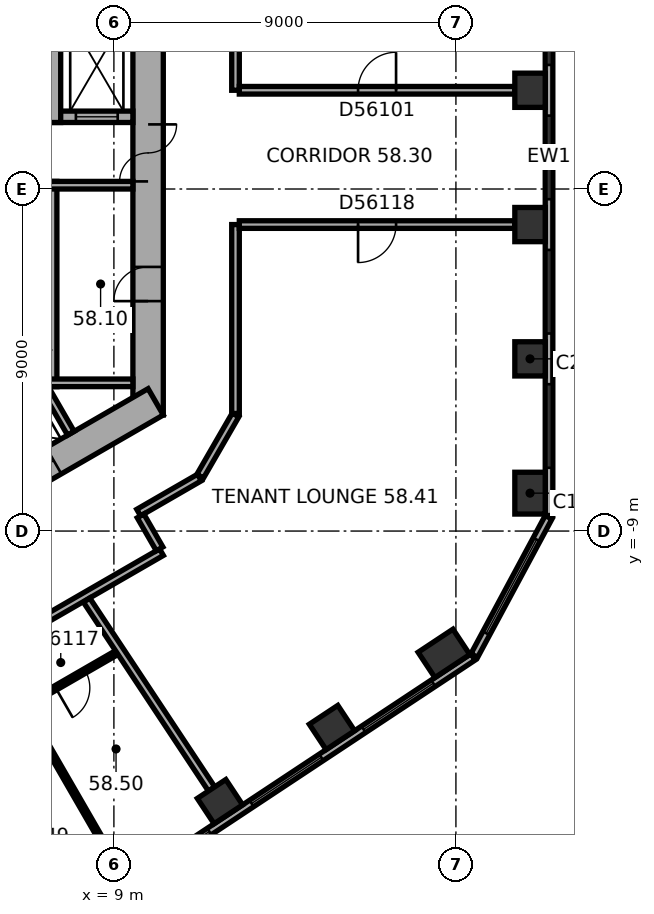
"""IFC4 building model, lengths in metres.
Left out: names, types, materials, properties, quantities, classifications, styles, units other than length and angle.
Written with IfcOpenShell. Run it as: python <this file> out.ifc"""

import sys

from ifc_helpers import new_model, si_unit, direction, frame, frame_2d, origin, origin_2d, place, context, subcontext, project, spatial, rectangle, extrude, element, fill, save


model = new_model("IFC4")
c1 = context("Model", 3, precision=1e-05, world=origin(), true_north=direction((0.0, 1.0)))
c2 = subcontext(c1, "Body", "Model", "MODEL_VIEW")
j1 = project(units=[si_unit("LENGTHUNIT", "METRE"), si_unit("PLANEANGLEUNIT", "RADIAN")], contexts=[c1])
p1 = place(None, origin())
s1 = spatial("IfcSite", under=j1, at=p1, CompositionType="ELEMENT")
p2 = place(p1, origin())
s2 = spatial("IfcBuilding", under=s1, at=p2, CompositionType="ELEMENT")
p3 = place(p2, frame((0.0, 0.0, 236.5)))
s3 = spatial("IfcBuildingStorey", under=s2, at=p3, CompositionType="ELEMENT", Elevation=236.5)
p4 = place(p3, frame((19.95, -8.003, 0.0), z_axis=(0.0, 0.0, 1.0), x_axis=(0.0, 1.0, 0.0)))
e1 = element("IfcColumn", 1, at=p4, inside=s3, PredefinedType="COLUMN", context=c2, shape_type="SweptSolid", body=[
    extrude(rectangle(XDim=1.1, YDim=0.8, at=origin_2d()), origin(), (0.0, 0.0, 1.0), 3.7),
])
for number, where, z_axis, x_axis in (
    (2, (19.95, -4.469, 0.0), (0.0, 0.0, 1.0), (0.0, 1.0, 0.0)),
    (3, (19.95, -0.936, 0.0), (0.0, 0.0, 1.0), (0.0, 1.0, 0.0)),
    (4, (19.95, 2.598, 0.0), (0.0, 0.0, 1.0), (0.0, 1.0, 0.0)),
    (5, (11.791, -16.12, 0.0), (0.0, 0.0, 1.0), (0.834, 0.552, 0.0)),
    (6, (14.738, -14.169, 0.0), (0.0, 0.0, 1.0), (0.834, 0.552, 0.0)),
):
    element("IfcColumn", number, at=place(p3, frame(where, z_axis=z_axis, x_axis=x_axis)), inside=s3, PredefinedType="COLUMN", context=c2, shape_type="SweptSolid", body=[
        extrude(rectangle(XDim=0.9, YDim=0.8, at=origin_2d()), origin(), (0.0, 0.0, 1.0), 3.7),
    ])
p5 = place(p3, frame((17.685, -12.219, 0.0), z_axis=(0.0, 0.0, 1.0), x_axis=(0.833885822067, 0.551936985312, 0.0)))
e7 = element("IfcColumn", 7, at=p5, inside=s3, PredefinedType="COLUMN", context=c2, shape_type="SweptSolid", body=[
    extrude(rectangle(XDim=1.1, YDim=0.8, at=origin_2d()), origin(), (0.0, 0.0, 1.0), 3.7),
])
p6 = place(p3, frame((9.9, -5.947, 0.0), z_axis=(0.0, 0.0, 1.0), x_axis=(0.0, 1.0, 0.0)))
e8 = element("IfcWall", 8, at=p6, inside=s3, PredefinedType="SHEAR", context=c2, shape_type="SweptSolid", body=[
    extrude(rectangle(XDim=11.894, YDim=0.8, at=frame_2d((5.947, 0.0))), origin(), (0.0, 0.0, 1.0), 3.7),
])
p7 = place(p6, frame((6.147, 0.0, 0.0)))
e9 = element("IfcOpeningElement", 9, at=p7, cuts=e8, PredefinedType="OPENING", context=c2, shape_type="SweptSolid", body=[
    extrude(rectangle(XDim=1.5, YDim=2.1, at=frame_2d((0.75, 1.05))), frame((0.0, 0.41, 0.0), z_axis=(0.0, -1.0, 0.0), x_axis=(1.0, 0.0, 0.0)), (0.0, 0.0, 1.0), 0.82),
])
p8 = place(p6, frame((2.997, 0.0, 0.0)))
e10 = element("IfcOpeningElement", 10, at=p8, cuts=e8, PredefinedType="OPENING", context=c2, shape_type="SweptSolid", body=[
    extrude(rectangle(XDim=0.9, YDim=2.1, at=frame_2d((0.45, 1.05))), frame((0.0, 0.41, 0.0), z_axis=(0.0, -1.0, 0.0), x_axis=(1.0, 0.0, 0.0)), (0.0, 0.0, 1.0), 0.82),
])
p9 = place(p3, frame((-0.2, -11.547, 0.0), z_axis=(0.0, 0.0, 1.0), x_axis=(0.866023897231, 0.500002609418, 0.0)))
e11 = element("IfcWall", 11, at=p9, inside=s3, PredefinedType="SHEAR", context=c2, shape_type="SweptSolid", body=[
    extrude(rectangle(XDim=11.894, YDim=0.8, at=frame_2d((5.947, 0.0))), origin(), (0.0, 0.0, 1.0), 3.7),
])
p10 = place(p9, frame((2.497, 0.0, 0.0)))
e12 = element("IfcOpeningElement", 12, at=p10, cuts=e11, PredefinedType="OPENING", context=c2, shape_type="SweptSolid", body=[
    extrude(rectangle(XDim=1.1, YDim=2.1, at=frame_2d((0.55, 1.05))), frame((0.0, 0.41, 0.0), z_axis=(0.0, -1.0, 0.0), x_axis=(1.0, 0.0, 0.0)), (0.0, 0.0, 1.0), 0.82),
])
p11 = place(p9, frame((5.097, 0.0, 0.0)))
e13 = element("IfcOpeningElement", 13, at=p11, cuts=e11, PredefinedType="OPENING", context=c2, shape_type="SweptSolid", body=[
    extrude(rectangle(XDim=1.1, YDim=2.1, at=frame_2d((0.55, 1.05))), frame((0.0, 0.41, 0.0), z_axis=(0.0, -1.0, 0.0), x_axis=(1.0, 0.0, 0.0)), (0.0, 0.0, 1.0), 0.82),
])
p12 = place(p9, frame((7.697, 0.0, 0.0)))
e14 = element("IfcOpeningElement", 14, at=p12, cuts=e11, PredefinedType="OPENING", context=c2, shape_type="SweptSolid", body=[
    extrude(rectangle(XDim=1.1, YDim=2.1, at=frame_2d((0.55, 1.05))), frame((0.0, 0.41, 0.0), z_axis=(0.0, -1.0, 0.0), x_axis=(1.0, 0.0, 0.0)), (0.0, 0.0, 1.0), 0.82),
])
p13 = place(p3, frame((20.45, -8.59, 0.0), z_axis=(0.0, 0.0, 1.0), x_axis=(0.0, 1.0, 0.0)))
e15 = element("IfcWall", 15, at=p13, inside=s3, PredefinedType="STANDARD", context=c2, shape_type="SweptSolid", body=[
    extrude(rectangle(XDim=18.841, YDim=0.2, at=frame_2d((9.421, 0.0))), origin(), (0.0, 0.0, 1.0), 3.7),
])
p14 = place(p13, frame((1.254, 0.0, 0.9)))
e16 = element("IfcOpeningElement", 16, at=p14, cuts=e15, PredefinedType="OPENING", context=c2, shape_type="SweptSolid", body=[
    extrude(rectangle(XDim=2.2, YDim=2.0, at=frame_2d((1.1, 1.0))), frame((0.0, 0.11, 0.0), z_axis=(0.0, -1.0, 0.0), x_axis=(1.0, 0.0, 0.0)), (0.0, 0.0, 1.0), 0.22),
])
p15 = place(p13, frame((4.788, 0.0, 0.9)))
e17 = element("IfcOpeningElement", 17, at=p15, cuts=e15, PredefinedType="OPENING", context=c2, shape_type="SweptSolid", body=[
    extrude(rectangle(XDim=2.2, YDim=2.0, at=frame_2d((1.1, 1.0))), frame((0.0, 0.11, 0.0), z_axis=(0.0, -1.0, 0.0), x_axis=(1.0, 0.0, 0.0)), (0.0, 0.0, 1.0), 0.22),
])
p16 = place(p13, frame((8.322, 0.0, 0.9)))
e18 = element("IfcOpeningElement", 18, at=p16, cuts=e15, PredefinedType="OPENING", context=c2, shape_type="SweptSolid", body=[
    extrude(rectangle(XDim=2.2, YDim=2.0, at=frame_2d((1.1, 1.0))), frame((0.0, 0.11, 0.0), z_axis=(0.0, -1.0, 0.0), x_axis=(1.0, 0.0, 0.0)), (0.0, 0.0, 1.0), 0.22),
])
p17 = place(p13, frame((11.855, 0.0, 0.9)))
e19 = element("IfcOpeningElement", 19, at=p17, cuts=e15, PredefinedType="OPENING", context=c2, shape_type="SweptSolid", body=[
    extrude(rectangle(XDim=2.2, YDim=2.0, at=frame_2d((1.1, 1.0))), frame((0.0, 0.11, 0.0), z_axis=(0.0, -1.0, 0.0), x_axis=(1.0, 0.0, 0.0)), (0.0, 0.0, 1.0), 0.22),
])
p18 = place(p13, frame((15.389, 0.0, 0.9)))
e20 = element("IfcOpeningElement", 20, at=p18, cuts=e15, PredefinedType="OPENING", context=c2, shape_type="SweptSolid", body=[
    extrude(rectangle(XDim=2.2, YDim=2.0, at=frame_2d((1.1, 1.0))), frame((0.0, 0.11, 0.0), z_axis=(0.0, -1.0, 0.0), x_axis=(1.0, 0.0, 0.0)), (0.0, 0.0, 1.0), 0.22),
])
p19 = place(p3, frame((2.739, -22.711, 0.0), z_axis=(0.0, 0.0, 1.0), x_axis=(0.833885723098, 0.551937134838, 0.0)))
e21 = element("IfcWall", 21, at=p19, inside=s3, PredefinedType="STANDARD", context=c2, shape_type="SweptSolid", body=[
    extrude(rectangle(XDim=18.841, YDim=0.2, at=frame_2d((9.421, 0.0))), origin(), (0.0, 0.0, 1.0), 3.7),
])
p20 = place(p19, frame((1.252, 0.0, 0.9)))
e22 = element("IfcOpeningElement", 22, at=p20, cuts=e21, PredefinedType="OPENING", context=c2, shape_type="SweptSolid", body=[
    extrude(rectangle(XDim=2.2, YDim=2.0, at=frame_2d((1.1, 1.0))), frame((0.0, 0.11, 0.0), z_axis=(0.0, -1.0, 0.0), x_axis=(1.0, 0.0, 0.0)), (0.0, 0.0, 1.0), 0.22),
])
p21 = place(p19, frame((4.786, 0.0, 0.9)))
e23 = element("IfcOpeningElement", 23, at=p21, cuts=e21, PredefinedType="OPENING", context=c2, shape_type="SweptSolid", body=[
    extrude(rectangle(XDim=2.2, YDim=2.0, at=frame_2d((1.1, 1.0))), frame((0.0, 0.11, 0.0), z_axis=(0.0, -1.0, 0.0), x_axis=(1.0, 0.0, 0.0)), (0.0, 0.0, 1.0), 0.22),
])
p22 = place(p19, frame((8.32, 0.0, 0.9)))
e24 = element("IfcOpeningElement", 24, at=p22, cuts=e21, PredefinedType="OPENING", context=c2, shape_type="SweptSolid", body=[
    extrude(rectangle(XDim=2.2, YDim=2.0, at=frame_2d((1.1, 1.0))), frame((0.0, 0.11, 0.0), z_axis=(0.0, -1.0, 0.0), x_axis=(1.0, 0.0, 0.0)), (0.0, 0.0, 1.0), 0.22),
])
p23 = place(p19, frame((11.854, 0.0, 0.9)))
e25 = element("IfcOpeningElement", 25, at=p23, cuts=e21, PredefinedType="OPENING", context=c2, shape_type="SweptSolid", body=[
    extrude(rectangle(XDim=2.2, YDim=2.0, at=frame_2d((1.1, 1.0))), frame((0.0, 0.11, 0.0), z_axis=(0.0, -1.0, 0.0), x_axis=(1.0, 0.0, 0.0)), (0.0, 0.0, 1.0), 0.22),
])
p24 = place(p19, frame((15.387, 0.0, 0.9)))
e26 = element("IfcOpeningElement", 26, at=p24, cuts=e21, PredefinedType="OPENING", context=c2, shape_type="SweptSolid", body=[
    extrude(rectangle(XDim=2.2, YDim=2.0, at=frame_2d((1.1, 1.0))), frame((0.0, 0.11, 0.0), z_axis=(0.0, -1.0, 0.0), x_axis=(1.0, 0.0, 0.0)), (0.0, 0.0, 1.0), 0.22),
])
p25 = place(p3, frame((18.483, -12.276, 0.0), z_axis=(0.0, 0.0, 1.0), x_axis=(0.473267675015, 0.880918672629, 0.0)))
e27 = element("IfcWall", 27, at=p25, inside=s3, PredefinedType="STANDARD", context=c2, shape_type="SweptSolid", body=[
    extrude(rectangle(XDim=4.13, YDim=0.2, at=frame_2d((2.065, 0.0))), origin(), (0.0, 0.0, 1.0), 3.7),
])
p26 = place(p25, frame((0.665, 0.0, 0.9)))
e28 = element("IfcOpeningElement", 28, at=p26, cuts=e27, PredefinedType="OPENING", context=c2, shape_type="SweptSolid", body=[
    extrude(rectangle(XDim=2.8, YDim=2.0, at=frame_2d((1.4, 1.0))), frame((0.0, 0.11, 0.0), z_axis=(0.0, -1.0, 0.0), x_axis=(1.0, 0.0, 0.0)), (0.0, 0.0, 1.0), 0.22),
])
p27 = place(p3, frame((7.4, -5.2, 0.0), z_axis=(0.0, 0.0, 1.0), x_axis=(0.0, 1.0, 0.0)))
e29 = element("IfcWall", 29, at=p27, inside=s3, PredefinedType="PARTITIONING", context=c2, shape_type="SweptSolid", body=[
    extrude(rectangle(XDim=5.4, YDim=0.2, at=frame_2d((2.7, 0.0))), origin(), (0.0, 0.0, 1.0), 3.42),
])
for number, where, z_axis, x_axis in (
    (30, (7.3, -5.1, 0.0), (0.0, 0.0, 1.0), (1.0, 0.0, 0.0)),
    (31, (7.3, 0.1, 0.0), (0.0, 0.0, 1.0), (1.0, 0.0, 0.0)),
    (32, (6.768, -4.522, 0.0), (0.0, 0.0, 1.0), (0.5, -0.866, 0.0)),
):
    element("IfcWall", number, at=place(p3, frame(where, z_axis=z_axis, x_axis=x_axis)), inside=s3, PredefinedType="PARTITIONING", context=c2, shape_type="SweptSolid", body=[
        extrude(rectangle(XDim=2.2, YDim=0.2, at=frame_2d((1.1, 0.0))), origin(), (0.0, 0.0, 1.0), 3.42),
    ])
p28 = place(p3, frame((7.3, 1.9, 0.0), z_axis=(0.0, 0.0, 1.0), x_axis=(1.0, 0.0, 0.0)))
e33 = element("IfcWall", 33, at=p28, inside=s3, PredefinedType="SHEAR", context=c2, shape_type="SweptSolid", body=[
    extrude(rectangle(XDim=2.2, YDim=0.3, at=frame_2d((1.1, 0.0))), origin(), (0.0, 0.0, 1.0), 3.42),
])
p29 = place(p28, frame((0.7, 0.0, 0.0)))
e34 = element("IfcOpeningElement", 34, at=p29, cuts=e33, PredefinedType="OPENING", context=c2, shape_type="SweptSolid", body=[
    extrude(rectangle(XDim=1.1, YDim=2.1, at=frame_2d((0.55, 1.05))), frame((0.0, 0.16, 0.0), z_axis=(0.0, -1.0, 0.0), x_axis=(1.0, 0.0, 0.0)), (0.0, 0.0, 1.0), 0.32),
])
p30 = place(p3, frame((7.45, 1.75, 0.0), z_axis=(0.0, 0.0, 1.0), x_axis=(0.0, 1.0, 0.0)))
e35 = element("IfcWall", 35, at=p30, inside=s3, PredefinedType="SHEAR", context=c2, shape_type="SweptSolid", body=[
    extrude(rectangle(XDim=3.35, YDim=0.3, at=frame_2d((1.675, 0.0))), origin(), (0.0, 0.0, 1.0), 3.42),
])
p31 = place(p3, frame((2.716, -13.906, 0.0), z_axis=(0.0, 0.0, 1.0), x_axis=(0.866040290674, 0.499974214264, 0.0)))
e36 = element("IfcWall", 36, at=p31, inside=s3, PredefinedType="PARTITIONING", context=c2, shape_type="SweptSolid", body=[
    extrude(rectangle(XDim=8.702, YDim=0.2, at=frame_2d((4.351, 0.0))), origin(), (0.0, 0.0, 1.0), 3.42),
])
p32 = place(p31, frame((2.679, 0.0, 0.0)))
e37 = element("IfcOpeningElement", 37, at=p32, cuts=e36, PredefinedType="OPENING", context=c2, shape_type="SweptSolid", body=[
    extrude(rectangle(XDim=1.0, YDim=2.1, at=frame_2d((0.5, 1.05))), frame((0.0, 0.11, 0.0), z_axis=(0.0, -1.0, 0.0), x_axis=(1.0, 0.0, 0.0)), (0.0, 0.0, 1.0), 0.22),
])
p33 = place(p3, frame((3.117, -15.638, 0.0), z_axis=(0.0, 0.0, 1.0), x_axis=(0.866031365477, 0.499989673903, 0.0)))
e38 = element("IfcWall", 38, at=p33, inside=s3, PredefinedType="PARTITIONING", context=c2, shape_type="SweptSolid", body=[
    extrude(rectangle(XDim=6.881, YDim=0.12, at=frame_2d((3.44, 0.0))), origin(), (0.0, 0.0, 1.0), 3.42),
])
p34 = place(p33, frame((0.5, 0.0, 0.0)))
e39 = element("IfcOpeningElement", 39, at=p34, cuts=e38, PredefinedType="OPENING", context=c2, shape_type="SweptSolid", body=[
    extrude(rectangle(XDim=1.0, YDim=2.1, at=frame_2d((0.5, 1.05))), frame((0.0, 0.07, 0.0), z_axis=(0.0, -1.0, 0.0), x_axis=(1.0, 0.0, 0.0)), (0.0, 0.0, 1.0), 0.14),
])
p35 = place(p33, frame((2.583, 0.0, 0.0)))
e40 = element("IfcOpeningElement", 40, at=p35, cuts=e38, PredefinedType="OPENING", context=c2, shape_type="SweptSolid", body=[
    extrude(rectangle(XDim=0.9, YDim=2.1, at=frame_2d((0.45, 1.05))), frame((0.0, 0.07, 0.0), z_axis=(0.0, -1.0, 0.0), x_axis=(1.0, 0.0, 0.0)), (0.0, 0.0, 1.0), 0.14),
])
p36 = place(p33, frame((5.023, 0.0, 0.0)))
e41 = element("IfcOpeningElement", 41, at=p36, cuts=e38, PredefinedType="OPENING", context=c2, shape_type="SweptSolid", body=[
    extrude(rectangle(XDim=0.9, YDim=2.1, at=frame_2d((0.45, 1.05))), frame((0.0, 0.07, 0.0), z_axis=(0.0, -1.0, 0.0), x_axis=(1.0, 0.0, 0.0)), (0.0, 0.0, 1.0), 0.14),
])
p37 = place(p3, frame((8.912, -17.545, 0.0), z_axis=(0.0, 0.0, 1.0), x_axis=(-0.500022113525, 0.866012636158, 0.0)))
e42 = element("IfcWall", 42, at=p37, inside=s3, PredefinedType="PARTITIONING", context=c2, shape_type="SweptSolid", body=[
    extrude(rectangle(XDim=4.49, YDim=0.12, at=frame_2d((2.245, 0.0))), origin(), (0.0, 0.0, 1.0), 2.87),
])
p38 = place(p3, frame((9.652, -8.515, 0.0), z_axis=(0.0, 0.0, 1.0), x_axis=(0.866020375458, 0.500008709215, 0.0)))
e43 = element("IfcWall", 43, at=p38, inside=s3, PredefinedType="PARTITIONING", context=c2, shape_type="SweptSolid", body=[
    extrude(rectangle(XDim=1.846, YDim=0.2, at=frame_2d((0.923, 0.0))), origin(), (0.0, 0.0, 1.0), 3.42),
])
p39 = place(p3, frame((10.202, -9.469, 0.0), z_axis=(0.0, 0.0, 1.0), x_axis=(-0.499968756647, 0.866043441391, 0.0)))
e44 = element("IfcWall", 44, at=p39, inside=s3, PredefinedType="PARTITIONING", context=c2, shape_type="SweptSolid", body=[
    extrude(rectangle(XDim=1.001, YDim=0.2, at=frame_2d((0.5, 0.0))), origin(), (0.0, 0.0, 1.0), 3.42),
])
p40 = place(p3, frame((11.27, -7.558, 0.0), z_axis=(0.0, 0.0, 1.0), x_axis=(0.499964847546, 0.866045698112, 0.0)))
e45 = element("IfcWall", 45, at=p40, inside=s3, PredefinedType="PARTITIONING", context=c2, shape_type="SweptSolid", body=[
    extrude(rectangle(XDim=1.86, YDim=0.2, at=frame_2d((0.93, 0.0))), origin(), (0.0, 0.0, 1.0), 3.42),
])
p41 = place(p3, frame((11.571, -15.786, 0.0), z_axis=(0.0, 0.0, 1.0), x_axis=(-0.551944861763, 0.833880608705, 0.0)))
e46 = element("IfcWall", 46, at=p41, inside=s3, PredefinedType="PARTITIONING", context=c2, shape_type="SweptSolid", body=[
    extrude(rectangle(XDim=5.957, YDim=0.2, at=frame_2d((2.979, 0.0))), origin(), (0.0, 0.0, 1.0), 3.42),
])
p42 = place(p3, frame((12.2, -5.907, 0.0), z_axis=(0.0, 0.0, 1.0), x_axis=(0.0, 1.0, 0.0)))
e47 = element("IfcWall", 47, at=p42, inside=s3, PredefinedType="PARTITIONING", context=c2, shape_type="SweptSolid", body=[
    extrude(rectangle(XDim=4.971, YDim=0.2, at=frame_2d((2.486, 0.0))), origin(), (0.0, 0.0, 1.0), 3.42),
])
p43 = place(p3, frame((12.2, 2.598, 0.0), z_axis=(0.0, 0.0, 1.0), x_axis=(0.0, 1.0, 0.0)))
e48 = element("IfcWall", 48, at=p43, inside=s3, PredefinedType="PARTITIONING", context=c2, shape_type="SweptSolid", body=[
    extrude(rectangle(XDim=3.349, YDim=0.2, at=frame_2d((1.674, 0.0))), origin(), (0.0, 0.0, 1.0), 3.42),
])
p44 = place(p3, frame((12.3, -0.936, 0.0), z_axis=(0.0, 0.0, 1.0), x_axis=(1.0, 0.0, 0.0)))
e49 = element("IfcWall", 49, at=p44, inside=s3, PredefinedType="PARTITIONING", context=c2, shape_type="SweptSolid", body=[
    extrude(rectangle(XDim=7.25, YDim=0.2, at=frame_2d((3.625, 0.0))), origin(), (0.0, 0.0, 1.0), 2.87),
])
p45 = place(p44, frame((3.125, 0.0, 0.0)))
e50 = element("IfcOpeningElement", 50, at=p45, cuts=e49, PredefinedType="OPENING", context=c2, shape_type="SweptSolid", body=[
    extrude(rectangle(XDim=1.0, YDim=2.1, at=frame_2d((0.5, 1.05))), frame((0.0, 0.11, 0.0), z_axis=(0.0, -1.0, 0.0), x_axis=(1.0, 0.0, 0.0)), (0.0, 0.0, 1.0), 0.22),
])
p46 = place(p3, frame((19.55, 2.598, 0.0), z_axis=(0.0, 0.0, 1.0), x_axis=(-1.0, 0.0, 0.0)))
e51 = element("IfcWall", 51, at=p46, inside=s3, PredefinedType="PARTITIONING", context=c2, shape_type="SweptSolid", body=[
    extrude(rectangle(XDim=7.25, YDim=0.2, at=frame_2d((3.625, 0.0))), origin(), (0.0, 0.0, 1.0), 3.42),
])
p47 = place(p46, frame((3.125, 0.0, 0.0)))
e52 = element("IfcOpeningElement", 52, at=p47, cuts=e51, PredefinedType="OPENING", context=c2, shape_type="SweptSolid", body=[
    extrude(rectangle(XDim=1.0, YDim=2.1, at=frame_2d((0.5, 1.05))), frame((0.0, 0.11, 0.0), z_axis=(0.0, -1.0, 0.0), x_axis=(1.0, 0.0, 0.0)), (0.0, 0.0, 1.0), 0.22),
])
p48 = place(p14, origin())
e53 = element("IfcWindow", 53, at=p48, inside=s3, PartitioningType="SINGLE_PANEL", PredefinedType="WINDOW", context=c2, shape_type="SweptSolid", body=[
    extrude(rectangle(XDim=2.2, YDim=2.0, at=frame_2d((1.1, 1.0))), frame((0.0, 0.03, 0.0), z_axis=(0.0, -1.0, 0.0), x_axis=(1.0, 0.0, 0.0)), (0.0, 0.0, 1.0), 0.06),
])
fill(e16, e53)
p49 = place(p15, origin())
e54 = element("IfcWindow", 54, at=p49, inside=s3, PartitioningType="SINGLE_PANEL", PredefinedType="WINDOW", context=c2, shape_type="SweptSolid", body=[
    extrude(rectangle(XDim=2.2, YDim=2.0, at=frame_2d((1.1, 1.0))), frame((0.0, 0.03, 0.0), z_axis=(0.0, -1.0, 0.0), x_axis=(1.0, 0.0, 0.0)), (0.0, 0.0, 1.0), 0.06),
])
fill(e17, e54)
p50 = place(p16, origin())
e55 = element("IfcWindow", 55, at=p50, inside=s3, PartitioningType="SINGLE_PANEL", PredefinedType="WINDOW", context=c2, shape_type="SweptSolid", body=[
    extrude(rectangle(XDim=2.2, YDim=2.0, at=frame_2d((1.1, 1.0))), frame((0.0, 0.03, 0.0), z_axis=(0.0, -1.0, 0.0), x_axis=(1.0, 0.0, 0.0)), (0.0, 0.0, 1.0), 0.06),
])
fill(e18, e55)
p51 = place(p17, origin())
e56 = element("IfcWindow", 56, at=p51, inside=s3, PartitioningType="SINGLE_PANEL", PredefinedType="WINDOW", context=c2, shape_type="SweptSolid", body=[
    extrude(rectangle(XDim=2.2, YDim=2.0, at=frame_2d((1.1, 1.0))), frame((0.0, 0.03, 0.0), z_axis=(0.0, -1.0, 0.0), x_axis=(1.0, 0.0, 0.0)), (0.0, 0.0, 1.0), 0.06),
])
fill(e19, e56)
p52 = place(p22, origin())
e57 = element("IfcWindow", 57, at=p52, inside=s3, PartitioningType="SINGLE_PANEL", PredefinedType="WINDOW", context=c2, shape_type="SweptSolid", body=[
    extrude(rectangle(XDim=2.2, YDim=2.0, at=frame_2d((1.1, 1.0))), frame((0.0, 0.03, 0.0), z_axis=(0.0, -1.0, 0.0), x_axis=(1.0, 0.0, 0.0)), (0.0, 0.0, 1.0), 0.06),
])
fill(e24, e57)
p53 = place(p23, origin())
e58 = element("IfcWindow", 58, at=p53, inside=s3, PartitioningType="SINGLE_PANEL", PredefinedType="WINDOW", context=c2, shape_type="SweptSolid", body=[
    extrude(rectangle(XDim=2.2, YDim=2.0, at=frame_2d((1.1, 1.0))), frame((0.0, 0.03, 0.0), z_axis=(0.0, -1.0, 0.0), x_axis=(1.0, 0.0, 0.0)), (0.0, 0.0, 1.0), 0.06),
])
fill(e25, e58)
p54 = place(p24, origin())
e59 = element("IfcWindow", 59, at=p54, inside=s3, PartitioningType="SINGLE_PANEL", PredefinedType="WINDOW", context=c2, shape_type="SweptSolid", body=[
    extrude(rectangle(XDim=2.2, YDim=2.0, at=frame_2d((1.1, 1.0))), frame((0.0, 0.03, 0.0), z_axis=(0.0, -1.0, 0.0), x_axis=(1.0, 0.0, 0.0)), (0.0, 0.0, 1.0), 0.06),
])
fill(e26, e59)
p55 = place(p26, origin())
e60 = element("IfcWindow", 60, at=p55, inside=s3, PartitioningType="SINGLE_PANEL", PredefinedType="WINDOW", context=c2, shape_type="SweptSolid", body=[
    extrude(rectangle(XDim=2.8, YDim=2.0, at=frame_2d((1.4, 1.0))), frame((0.0, 0.03, 0.0), z_axis=(0.0, -1.0, 0.0), x_axis=(1.0, 0.0, 0.0)), (0.0, 0.0, 1.0), 0.06),
])
fill(e28, e60)
p56 = place(p7, origin())
e61 = element("IfcDoor", 61, at=p56, inside=s3, OperationType="DOUBLE_DOOR_SINGLE_SWING", PredefinedType="DOOR", context=c2, shape_type="SweptSolid", body=[
    extrude(rectangle(XDim=1.5, YDim=2.1, at=frame_2d((0.75, 1.05))), frame((0.0, 0.025, 0.0), z_axis=(0.0, -1.0, 0.0), x_axis=(1.0, 0.0, 0.0)), (0.0, 0.0, 1.0), 0.05),
])
fill(e9, e61)
p57 = place(p8, origin())
e62 = element("IfcDoor", 62, at=p57, inside=s3, OperationType="SINGLE_SWING_LEFT", PredefinedType="DOOR", context=c2, shape_type="SweptSolid", body=[
    extrude(rectangle(XDim=0.9, YDim=2.1, at=frame_2d((0.45, 1.05))), frame((0.0, 0.025, 0.0), z_axis=(0.0, -1.0, 0.0), x_axis=(1.0, 0.0, 0.0)), (0.0, 0.0, 1.0), 0.05),
])
fill(e10, e62)
p58 = place(p29, origin())
e63 = element("IfcDoor", 63, at=p58, inside=s3, OperationType="DOUBLE_DOOR_SLIDING", PredefinedType="DOOR", context=c2, shape_type="SweptSolid", body=[
    extrude(rectangle(XDim=1.1, YDim=2.1, at=frame_2d((0.55, 1.05))), frame((0.0, 0.025, 0.0), z_axis=(0.0, -1.0, 0.0), x_axis=(1.0, 0.0, 0.0)), (0.0, 0.0, 1.0), 0.05),
])
fill(e34, e63)
p59 = place(p12, origin())
e64 = element("IfcDoor", 64, at=p59, inside=s3, OperationType="DOUBLE_DOOR_SLIDING", PredefinedType="DOOR", context=c2, shape_type="SweptSolid", body=[
    extrude(rectangle(XDim=1.1, YDim=2.1, at=frame_2d((0.55, 1.05))), frame((0.0, 0.025, 0.0), z_axis=(0.0, -1.0, 0.0), x_axis=(1.0, 0.0, 0.0)), (0.0, 0.0, 1.0), 0.05),
])
fill(e14, e64)
p60 = place(p47, origin())
e65 = element("IfcDoor", 65, at=p60, inside=s3, OperationType="SINGLE_SWING_LEFT", PredefinedType="DOOR", context=c2, shape_type="SweptSolid", body=[
    extrude(rectangle(XDim=1.0, YDim=2.1, at=frame_2d((0.5, 1.05))), frame((0.0, 0.025, 0.0), z_axis=(0.0, -1.0, 0.0), x_axis=(1.0, 0.0, 0.0)), (0.0, 0.0, 1.0), 0.05),
])
fill(e52, e65)
p61 = place(p36, origin())
e66 = element("IfcDoor", 66, at=p61, inside=s3, OperationType="SINGLE_SWING_LEFT", PredefinedType="DOOR", context=c2, shape_type="SweptSolid", body=[
    extrude(rectangle(XDim=0.9, YDim=2.1, at=frame_2d((0.45, 1.05))), frame((0.0, 0.025, 0.0), z_axis=(0.0, -1.0, 0.0), x_axis=(1.0, 0.0, 0.0)), (0.0, 0.0, 1.0), 0.05),
])
fill(e41, e66)
p62 = place(p45, origin())
e67 = element("IfcDoor", 67, at=p62, inside=s3, OperationType="SINGLE_SWING_LEFT", PredefinedType="DOOR", context=c2, shape_type="SweptSolid", body=[
    extrude(rectangle(XDim=1.0, YDim=2.1, at=frame_2d((0.5, 1.05))), frame((0.0, 0.025, 0.0), z_axis=(0.0, -1.0, 0.0), x_axis=(1.0, 0.0, 0.0)), (0.0, 0.0, 1.0), 0.05),
])
fill(e50, e67)
save(model, sys.argv[1])
